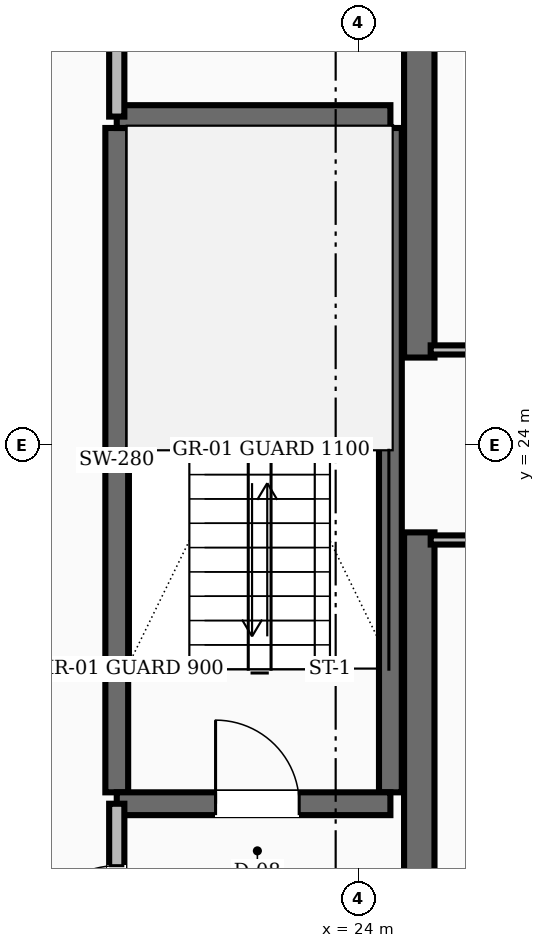
"""IFC4 building model, lengths in metres.
Left out: names, types, materials, properties, quantities, classifications, styles, units other than length and angle.
Written with IfcOpenShell. Run it as: python <this file> out.ifc"""

import sys

from ifc_helpers import new_model, si_unit, direction, frame, frame_2d, origin, place, context, subcontext, project, spatial, rectangle, extrude, element, fill, save


model = new_model("IFC4")
c1 = context("Model", 3, precision=1e-05, world=origin(), true_north=direction((0.0, 1.0)))
c2 = subcontext(c1, "Body", "Model", "MODEL_VIEW")
j1 = project(units=[si_unit("LENGTHUNIT", "METRE"), si_unit("PLANEANGLEUNIT", "RADIAN")], contexts=[c1])
p1 = place(None, origin())
s1 = spatial("IfcSite", under=j1, at=p1, CompositionType="ELEMENT")
p2 = place(p1, origin())
s2 = spatial("IfcBuilding", under=s1, at=p2, CompositionType="ELEMENT")
p3 = place(p2, frame((0.0, 0.0, 41.2)))
s3 = spatial("IfcBuildingStorey", under=s2, at=p3, CompositionType="ELEMENT", Elevation=41.2)
for number, where, z_axis, x_axis in (
    (1, (24.8, 16.55, 0.0), (0.0, 0.0, 1.0), (0.0, 1.0, 0.0)),
    (2, (24.8, 25.15, 0.0), (0.0, 0.0, 1.0), (0.0, 1.0, 0.0)),
):
    element("IfcWall", number, at=place(p3, frame(where, z_axis=z_axis, x_axis=x_axis)), inside=s3, PredefinedType="SHEAR", context=c2, shape_type="SweptSolid", body=[
        extrude(rectangle(XDim=6.3, YDim=0.4, at=frame_2d((3.15, 0.0))), origin(), (0.0, 0.0, 1.0), 3.6),
    ])
for number, where, z_axis, x_axis in (
    (3, (20.82, 19.43, 0.0), (0.0, 0.0, 1.0), (0.0, 1.0, 0.0)),
    (4, (24.42, 19.43, 0.0), (0.0, 0.0, 1.0), (0.0, 1.0, 0.0)),
):
    element("IfcWall", number, at=place(p3, frame(where, z_axis=z_axis, x_axis=x_axis)), inside=s3, PredefinedType="SHEAR", context=c2, shape_type="SweptSolid", body=[
        extrude(rectangle(XDim=8.74, YDim=0.3, at=frame_2d((4.37, 0.0))), origin(), (0.0, 0.0, 1.0), 3.6),
    ])
p4 = place(p3, frame((20.82, 19.28, 0.0), z_axis=(0.0, 0.0, 1.0), x_axis=(1.0, 0.0, 0.0)))
e5 = element("IfcWall", 5, at=p4, inside=s3, PredefinedType="SHEAR", context=c2, shape_type="SweptSolid", body=[
    extrude(rectangle(XDim=3.6, YDim=0.3, at=frame_2d((1.8, 0.0))), origin(), (0.0, 0.0, 1.0), 3.6),
])
p5 = place(p4, frame((1.3, 0.0, 0.0)))
e6 = element("IfcOpeningElement", 6, at=p5, cuts=e5, PredefinedType="OPENING", context=c2, shape_type="SweptSolid", body=[
    extrude(rectangle(XDim=1.1, YDim=2.1, at=frame_2d((0.55, 1.05))), frame((0.0, 0.16, 0.0), z_axis=(0.0, -1.0, 0.0), x_axis=(1.0, 0.0, 0.0)), (0.0, 0.0, 1.0), 0.32),
])
p6 = place(p3, frame((20.82, 28.32, 0.0), z_axis=(0.0, 0.0, 1.0), x_axis=(1.0, 0.0, 0.0)))
e7 = element("IfcWall", 7, at=p6, inside=s3, PredefinedType="SHEAR", context=c2, shape_type="SweptSolid", body=[
    extrude(rectangle(XDim=3.6, YDim=0.3, at=frame_2d((1.8, 0.0))), origin(), (0.0, 0.0, 1.0), 3.6),
])
p7 = place(p3, frame((20.82, 16.55, 0.0), z_axis=(0.0, 0.0, 1.0), x_axis=(0.0, 1.0, 0.0)))
e8 = element("IfcWall", 8, at=p7, inside=s3, PredefinedType="SOLIDWALL", context=c2, shape_type="SweptSolid", body=[
    extrude(rectangle(XDim=2.73, YDim=0.2, at=frame_2d((1.365, 0.0))), origin(), (0.0, 0.0, 1.0), 2.61),
])
p8 = place(p7, frame((0.815, 0.0, 0.0)))
e9 = element("IfcOpeningElement", 9, at=p8, cuts=e8, PredefinedType="OPENING", context=c2, shape_type="SweptSolid", body=[
    extrude(rectangle(XDim=1.1, YDim=2.1, at=frame_2d((0.55, 1.05))), frame((0.0, 0.11, 0.0), z_axis=(0.0, -1.0, 0.0), x_axis=(1.0, 0.0, 0.0)), (0.0, 0.0, 1.0), 0.22),
])
p9 = place(p3, frame((20.82, 28.32, 0.0), z_axis=(0.0, 0.0, 1.0), x_axis=(0.0, 1.0, 0.0)))
e10 = element("IfcWall", 10, at=p9, inside=s3, PredefinedType="SOLIDWALL", context=c2, shape_type="SweptSolid", body=[
    extrude(rectangle(XDim=3.13, YDim=0.2, at=frame_2d((1.565, 0.0))), origin(), (0.0, 0.0, 1.0), 2.61),
])
p10 = place(p9, frame((1.09, 0.0, 0.0)))
e11 = element("IfcOpeningElement", 11, at=p10, cuts=e10, PredefinedType="OPENING", context=c2, shape_type="SweptSolid", body=[
    extrude(rectangle(XDim=0.95, YDim=2.1, at=frame_2d((0.475, 1.05))), frame((0.0, 0.11, 0.0), z_axis=(0.0, -1.0, 0.0), x_axis=(1.0, 0.0, 0.0)), (0.0, 0.0, 1.0), 0.22),
])
p11 = place(p3, frame((24.95, 25.25, 0.0), z_axis=(0.0, 0.0, 1.0), x_axis=(1.0, 0.0, 0.0)))
e12 = element("IfcWall", 12, at=p11, inside=s3, PredefinedType="PARTITIONING", context=c2, shape_type="SweptSolid", body=[
    extrude(rectangle(XDim=3.2, YDim=0.12, at=frame_2d((1.6, 0.0))), origin(), (0.0, 0.0, 1.0), 2.61),
])
p12 = place(p11, frame((1.125, 0.0, 0.0)))
e13 = element("IfcOpeningElement", 13, at=p12, cuts=e12, PredefinedType="OPENING", context=c2, shape_type="SweptSolid", body=[
    extrude(rectangle(XDim=0.95, YDim=2.1, at=frame_2d((0.475, 1.05))), frame((0.0, 0.07, 0.0), z_axis=(0.0, -1.0, 0.0), x_axis=(1.0, 0.0, 0.0)), (0.0, 0.0, 1.0), 0.14),
])
p13 = place(p3, frame((24.95, 22.75, 0.0), z_axis=(0.0, 0.0, 1.0), x_axis=(1.0, 0.0, 0.0)))
e14 = element("IfcWall", 14, at=p13, inside=s3, PredefinedType="PARTITIONING", context=c2, shape_type="SweptSolid", body=[
    extrude(rectangle(XDim=3.2, YDim=0.12, at=frame_2d((1.6, 0.0))), origin(), (0.0, 0.0, 1.0), 2.61),
])
p14 = place(p13, frame((1.125, 0.0, 0.0)))
e15 = element("IfcOpeningElement", 15, at=p14, cuts=e14, PredefinedType="OPENING", context=c2, shape_type="SweptSolid", body=[
    extrude(rectangle(XDim=0.95, YDim=2.1, at=frame_2d((0.475, 1.05))), frame((0.0, 0.07, 0.0), z_axis=(0.0, -1.0, 0.0), x_axis=(1.0, 0.0, 0.0)), (0.0, 0.0, 1.0), 0.14),
])
p15 = place(p5, origin())
e16 = element("IfcDoor", 16, at=p15, inside=s3, OperationType="SINGLE_SWING_LEFT", PredefinedType="DOOR", context=c2, shape_type="SweptSolid", body=[
    extrude(rectangle(XDim=1.1, YDim=2.1, at=frame_2d((0.55, 1.05))), frame((0.0, 0.025, 0.0), z_axis=(0.0, -1.0, 0.0), x_axis=(1.0, 0.0, 0.0)), (0.0, 0.0, 1.0), 0.05),
])
fill(e6, e16)
p16 = place(p8, origin())
e17 = element("IfcDoor", 17, at=p16, inside=s3, OperationType="SINGLE_SWING_LEFT", PredefinedType="DOOR", context=c2, shape_type="SweptSolid", body=[
    extrude(rectangle(XDim=1.1, YDim=2.1, at=frame_2d((0.55, 1.05))), frame((0.0, 0.025, 0.0), z_axis=(0.0, -1.0, 0.0), x_axis=(1.0, 0.0, 0.0)), (0.0, 0.0, 1.0), 0.05),
])
fill(e9, e17)
save(model, sys.argv[1])
